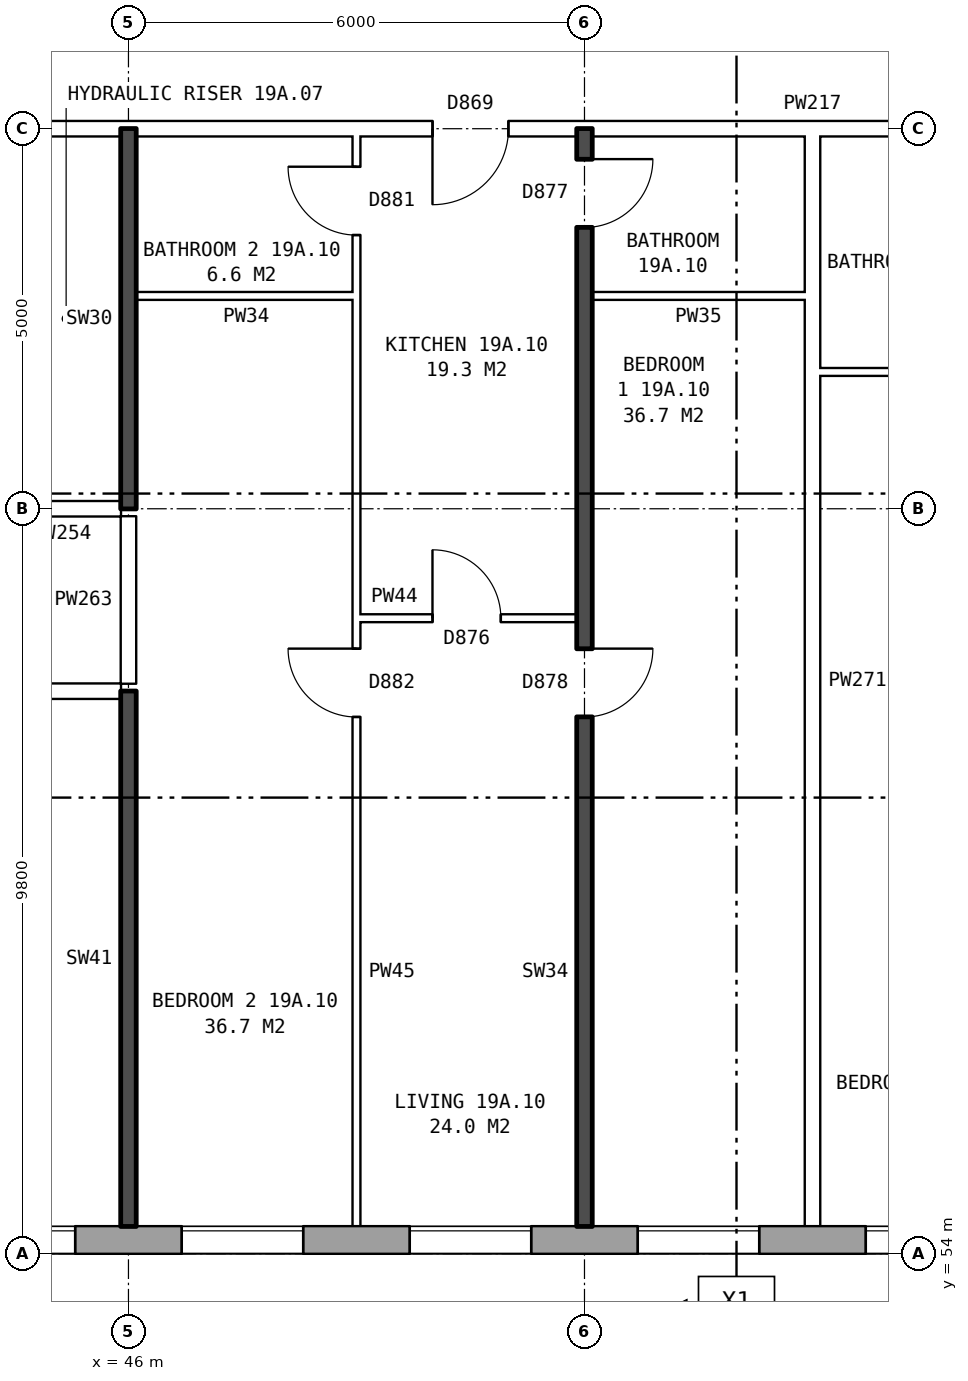
"""IFC4 building model, lengths in metres.
Left out: names, types, materials, properties, quantities, classifications, styles, units other than length and angle.
Written with IfcOpenShell. Run it as: python <this file> out.ifc"""

import sys

from ifc_helpers import new_model, si_unit, direction, frame, frame_2d, origin, place, context, subcontext, project, spatial, rectangle, extrude, element, fill, save


model = new_model("IFC4")
c1 = context("Model", 3, precision=1e-05, world=origin(), true_north=direction((0.0, 1.0)))
c2 = subcontext(c1, "Body", "Model", "MODEL_VIEW")
j1 = project(units=[si_unit("LENGTHUNIT", "METRE"), si_unit("PLANEANGLEUNIT", "RADIAN")], contexts=[c1])
p1 = place(None, origin())
s1 = spatial("IfcSite", under=j1, at=p1, CompositionType="ELEMENT")
p2 = place(p1, origin())
s2 = spatial("IfcBuilding", under=s1, at=p2, CompositionType="ELEMENT")
p3 = place(p2, frame((0.0, 0.0, 71.6)))
s3 = spatial("IfcBuildingStorey", under=s2, at=p3, CompositionType="ELEMENT", Elevation=71.6)
p4 = place(p3, frame((26.325, 54.18, 0.0), z_axis=(0.0, 0.0, 1.0), x_axis=(1.0, 0.0, 0.0)))
e1 = element("IfcWall", 1, at=p4, inside=s3, PredefinedType="STANDARD", context=c2, shape_type="SweptSolid", body=[
    extrude(rectangle(XDim=46.601, YDim=0.36, at=frame_2d((23.3, 0.0))), origin(), (0.0, 0.0, 1.0), 2.85),
])
p5 = place(p4, frame((1.875, 0.0, 1.0)))
e2 = element("IfcOpeningElement", 2, at=p5, cuts=e1, PredefinedType="OPENING", context=c2, shape_type="SweptSolid", body=[
    extrude(rectangle(XDim=0.6, YDim=1.5, at=frame_2d((0.3, 0.75))), frame((0.0, 0.19, 0.0), z_axis=(0.0, -1.0, 0.0), x_axis=(1.0, 0.0, 0.0)), (0.0, 0.0, 1.0), 0.38),
])
p6 = place(p4, frame((5.375, 0.0, 0.8)))
e3 = element("IfcOpeningElement", 3, at=p6, cuts=e1, PredefinedType="OPENING", context=c2, shape_type="SweptSolid", body=[
    extrude(rectangle(XDim=1.6, YDim=1.8, at=frame_2d((0.8, 0.9))), frame((0.0, 0.19, 0.0), z_axis=(0.0, -1.0, 0.0), x_axis=(1.0, 0.0, 0.0)), (0.0, 0.0, 1.0), 0.38),
])
p7 = place(p4, frame((8.375, 0.0, 0.8)))
e4 = element("IfcOpeningElement", 4, at=p7, cuts=e1, PredefinedType="OPENING", context=c2, shape_type="SweptSolid", body=[
    extrude(rectangle(XDim=1.6, YDim=1.8, at=frame_2d((0.8, 0.9))), frame((0.0, 0.19, 0.0), z_axis=(0.0, -1.0, 0.0), x_axis=(1.0, 0.0, 0.0)), (0.0, 0.0, 1.0), 0.38),
])
p8 = place(p4, frame((11.375, 0.0, 0.8)))
e5 = element("IfcOpeningElement", 5, at=p8, cuts=e1, PredefinedType="OPENING", context=c2, shape_type="SweptSolid", body=[
    extrude(rectangle(XDim=1.6, YDim=1.8, at=frame_2d((0.8, 0.9))), frame((0.0, 0.19, 0.0), z_axis=(0.0, -1.0, 0.0), x_axis=(1.0, 0.0, 0.0)), (0.0, 0.0, 1.0), 0.38),
])
p9 = place(p4, frame((14.375, 0.0, 0.8)))
e6 = element("IfcOpeningElement", 6, at=p9, cuts=e1, PredefinedType="OPENING", context=c2, shape_type="SweptSolid", body=[
    extrude(rectangle(XDim=1.6, YDim=1.8, at=frame_2d((0.8, 0.9))), frame((0.0, 0.19, 0.0), z_axis=(0.0, -1.0, 0.0), x_axis=(1.0, 0.0, 0.0)), (0.0, 0.0, 1.0), 0.38),
])
p10 = place(p4, frame((17.375, 0.0, 0.8)))
e7 = element("IfcOpeningElement", 7, at=p10, cuts=e1, PredefinedType="OPENING", context=c2, shape_type="SweptSolid", body=[
    extrude(rectangle(XDim=1.6, YDim=1.8, at=frame_2d((0.8, 0.9))), frame((0.0, 0.19, 0.0), z_axis=(0.0, -1.0, 0.0), x_axis=(1.0, 0.0, 0.0)), (0.0, 0.0, 1.0), 0.38),
])
p11 = place(p4, frame((20.375, 0.0, 0.8)))
e8 = element("IfcOpeningElement", 8, at=p11, cuts=e1, PredefinedType="OPENING", context=c2, shape_type="SweptSolid", body=[
    extrude(rectangle(XDim=1.6, YDim=1.8, at=frame_2d((0.8, 0.9))), frame((0.0, 0.19, 0.0), z_axis=(0.0, -1.0, 0.0), x_axis=(1.0, 0.0, 0.0)), (0.0, 0.0, 1.0), 0.38),
])
p12 = place(p4, frame((23.375, 0.0, 0.8)))
e9 = element("IfcOpeningElement", 9, at=p12, cuts=e1, PredefinedType="OPENING", context=c2, shape_type="SweptSolid", body=[
    extrude(rectangle(XDim=1.6, YDim=1.8, at=frame_2d((0.8, 0.9))), frame((0.0, 0.19, 0.0), z_axis=(0.0, -1.0, 0.0), x_axis=(1.0, 0.0, 0.0)), (0.0, 0.0, 1.0), 0.38),
])
p13 = place(p4, frame((26.375, 0.0, 0.8)))
e10 = element("IfcOpeningElement", 10, at=p13, cuts=e1, PredefinedType="OPENING", context=c2, shape_type="SweptSolid", body=[
    extrude(rectangle(XDim=1.6, YDim=1.8, at=frame_2d((0.8, 0.9))), frame((0.0, 0.19, 0.0), z_axis=(0.0, -1.0, 0.0), x_axis=(1.0, 0.0, 0.0)), (0.0, 0.0, 1.0), 0.38),
])
p14 = place(p4, frame((29.375, 0.0, 0.8)))
e11 = element("IfcOpeningElement", 11, at=p14, cuts=e1, PredefinedType="OPENING", context=c2, shape_type="SweptSolid", body=[
    extrude(rectangle(XDim=1.6, YDim=1.8, at=frame_2d((0.8, 0.9))), frame((0.0, 0.19, 0.0), z_axis=(0.0, -1.0, 0.0), x_axis=(1.0, 0.0, 0.0)), (0.0, 0.0, 1.0), 0.38),
])
p15 = place(p4, frame((32.375, 0.0, 0.8)))
e12 = element("IfcOpeningElement", 12, at=p15, cuts=e1, PredefinedType="OPENING", context=c2, shape_type="SweptSolid", body=[
    extrude(rectangle(XDim=1.6, YDim=1.8, at=frame_2d((0.8, 0.9))), frame((0.0, 0.19, 0.0), z_axis=(0.0, -1.0, 0.0), x_axis=(1.0, 0.0, 0.0)), (0.0, 0.0, 1.0), 0.38),
])
p16 = place(p4, frame((35.375, 0.0, 0.8)))
e13 = element("IfcOpeningElement", 13, at=p16, cuts=e1, PredefinedType="OPENING", context=c2, shape_type="SweptSolid", body=[
    extrude(rectangle(XDim=1.6, YDim=1.8, at=frame_2d((0.8, 0.9))), frame((0.0, 0.19, 0.0), z_axis=(0.0, -1.0, 0.0), x_axis=(1.0, 0.0, 0.0)), (0.0, 0.0, 1.0), 0.38),
])
p17 = place(p4, frame((38.375, 0.0, 0.8)))
e14 = element("IfcOpeningElement", 14, at=p17, cuts=e1, PredefinedType="OPENING", context=c2, shape_type="SweptSolid", body=[
    extrude(rectangle(XDim=1.6, YDim=1.8, at=frame_2d((0.8, 0.9))), frame((0.0, 0.19, 0.0), z_axis=(0.0, -1.0, 0.0), x_axis=(1.0, 0.0, 0.0)), (0.0, 0.0, 1.0), 0.38),
])
p18 = place(p4, frame((40.275, 0.0, 0.8)))
e15 = element("IfcOpeningElement", 15, at=p18, cuts=e1, PredefinedType="OPENING", context=c2, shape_type="SweptSolid", body=[
    extrude(rectangle(XDim=0.6, YDim=1.8, at=frame_2d((0.3, 0.9))), frame((0.0, 0.19, 0.0), z_axis=(0.0, -1.0, 0.0), x_axis=(1.0, 0.0, 0.0)), (0.0, 0.0, 1.0), 0.38),
])
p19 = place(p4, frame((44.375, 0.0, 0.8)))
e16 = element("IfcOpeningElement", 16, at=p19, cuts=e1, PredefinedType="OPENING", context=c2, shape_type="SweptSolid", body=[
    extrude(rectangle(XDim=1.6, YDim=1.8, at=frame_2d((0.8, 0.9))), frame((0.0, 0.19, 0.0), z_axis=(0.0, -1.0, 0.0), x_axis=(1.0, 0.0, 0.0)), (0.0, 0.0, 1.0), 0.38),
])
p20 = place(p4, frame((2.775, 0.0, 1.7)))
e17 = element("IfcOpeningElement", 17, at=p20, cuts=e1, PredefinedType="OPENING", context=c2, shape_type="SweptSolid", body=[
    extrude(rectangle(XDim=0.6, YDim=0.9, at=frame_2d((0.3, 0.45))), frame((0.0, 0.19, 0.0), z_axis=(0.0, -1.0, 0.0), x_axis=(1.0, 0.0, 0.0)), (0.0, 0.0, 1.0), 0.38),
])
p21 = place(p4, frame((41.175, 0.0, 0.8)))
e18 = element("IfcOpeningElement", 18, at=p21, cuts=e1, PredefinedType="OPENING", context=c2, shape_type="SweptSolid", body=[
    extrude(rectangle(XDim=0.8, YDim=0.9, at=frame_2d((0.4, 0.45))), frame((0.0, 0.19, 0.0), z_axis=(0.0, -1.0, 0.0), x_axis=(1.0, 0.0, 0.0)), (0.0, 0.0, 1.0), 0.38),
])
p22 = place(p3, frame((23.61, 61.4, 0.0), z_axis=(0.0, 0.0, 1.0), x_axis=(1.0, 0.0, 0.0)))
e19 = element("IfcWall", 19, at=p22, inside=s3, PredefinedType="PARTITIONING", context=c2, shape_type="SweptSolid", body=[
    extrude(rectangle(XDim=22.29, YDim=0.2, at=frame_2d((11.145, 0.0))), origin(), (0.0, 0.0, 1.0), 2.85),
])
p23 = place(p22, frame((18.84, 0.0, 0.0)))
e20 = element("IfcOpeningElement", 20, at=p23, cuts=e19, PredefinedType="OPENING", context=c2, shape_type="SweptSolid", body=[
    extrude(rectangle(XDim=1.0, YDim=2.1, at=frame_2d((0.5, 1.05))), frame((0.0, 0.11, 0.0), z_axis=(0.0, -1.0, 0.0), x_axis=(1.0, 0.0, 0.0)), (0.0, 0.0, 1.0), 0.22),
])
p24 = place(p22, frame((6.89, 0.0, 0.0)))
e21 = element("IfcOpeningElement", 21, at=p24, cuts=e19, PredefinedType="OPENING", context=c2, shape_type="SweptSolid", body=[
    extrude(rectangle(XDim=1.0, YDim=2.1, at=frame_2d((0.5, 1.05))), frame((0.0, 0.11, 0.0), z_axis=(0.0, -1.0, 0.0), x_axis=(1.0, 0.0, 0.0)), (0.0, 0.0, 1.0), 0.22),
])
p25 = place(p3, frame((49.0, 62.36, 0.0), z_axis=(0.0, 0.0, 1.0), x_axis=(1.0, 0.0, 0.0)))
e22 = element("IfcWall", 22, at=p25, inside=s3, PredefinedType="PARTITIONING", context=c2, shape_type="SweptSolid", body=[
    extrude(rectangle(XDim=2.9, YDim=0.1, at=frame_2d((1.45, 0.0))), origin(), (0.0, 0.0, 1.0), 2.85),
])
p26 = place(p25, frame((1.0, 0.0, 0.0)))
e23 = element("IfcOpeningElement", 23, at=p26, cuts=e22, PredefinedType="OPENING", context=c2, shape_type="SweptSolid", body=[
    extrude(rectangle(XDim=0.9, YDim=2.1, at=frame_2d((0.45, 1.05))), frame((0.0, 0.06, 0.0), z_axis=(0.0, -1.0, 0.0), x_axis=(1.0, 0.0, 0.0)), (0.0, 0.0, 1.0), 0.12),
])
p27 = place(p3, frame((44.36, 63.8, 0.0), z_axis=(0.0, 0.0, 1.0), x_axis=(1.0, 0.0, 0.0)))
e24 = element("IfcWall", 24, at=p27, inside=s3, PredefinedType="PARTITIONING", context=c2, shape_type="SweptSolid", body=[
    extrude(rectangle(XDim=1.54, YDim=0.2, at=frame_2d((0.77, 0.0))), origin(), (0.0, 0.0, 1.0), 2.85),
])
p28 = place(p3, frame((55.1, 65.6, 0.0), z_axis=(0.0, 0.0, 1.0), x_axis=(1.0, 0.0, 0.0)))
e25 = element("IfcWall", 25, at=p28, inside=s3, PredefinedType="PARTITIONING", context=c2, shape_type="SweptSolid", body=[
    extrude(rectangle(XDim=2.8, YDim=0.1, at=frame_2d((1.4, 0.0))), origin(), (0.0, 0.0, 1.0), 2.85),
])
p29 = place(p3, frame((46.1, 66.6, 0.0), z_axis=(0.0, 0.0, 1.0), x_axis=(1.0, 0.0, 0.0)))
e26 = element("IfcWall", 26, at=p29, inside=s3, PredefinedType="PARTITIONING", context=c2, shape_type="SweptSolid", body=[
    extrude(rectangle(XDim=2.9, YDim=0.1, at=frame_2d((1.45, 0.0))), origin(), (0.0, 0.0, 1.0), 2.85),
])
p30 = place(p3, frame((52.1, 66.6, 0.0), z_axis=(0.0, 0.0, 1.0), x_axis=(1.0, 0.0, 0.0)))
e27 = element("IfcWall", 27, at=p30, inside=s3, PredefinedType="PARTITIONING", context=c2, shape_type="SweptSolid", body=[
    extrude(rectangle(XDim=2.8, YDim=0.1, at=frame_2d((1.4, 0.0))), origin(), (0.0, 0.0, 1.0), 2.85),
])
p31 = place(p3, frame((44.36, 68.8, 0.0), z_axis=(0.0, 0.0, 1.0), x_axis=(1.0, 0.0, 0.0)))
e28 = element("IfcWall", 28, at=p31, inside=s3, PredefinedType="PARTITIONING", context=c2, shape_type="SweptSolid", body=[
    extrude(rectangle(XDim=19.28, YDim=0.2, at=frame_2d((9.64, 0.0))), origin(), (0.0, 0.0, 1.0), 2.85),
])
p32 = place(p31, frame((14.64, 0.0, 0.0)))
e29 = element("IfcOpeningElement", 29, at=p32, cuts=e28, PredefinedType="OPENING", context=c2, shape_type="SweptSolid", body=[
    extrude(rectangle(XDim=1.0, YDim=2.1, at=frame_2d((0.5, 1.05))), frame((0.0, 0.11, 0.0), z_axis=(0.0, -1.0, 0.0), x_axis=(1.0, 0.0, 0.0)), (0.0, 0.0, 1.0), 0.22),
])
p33 = place(p31, frame((5.64, 0.0, 0.0)))
e30 = element("IfcOpeningElement", 30, at=p33, cuts=e28, PredefinedType="OPENING", context=c2, shape_type="SweptSolid", body=[
    extrude(rectangle(XDim=1.0, YDim=2.1, at=frame_2d((0.5, 1.05))), frame((0.0, 0.11, 0.0), z_axis=(0.0, -1.0, 0.0), x_axis=(1.0, 0.0, 0.0)), (0.0, 0.0, 1.0), 0.22),
])
p34 = place(p3, frame((46.0, 54.36, 0.0), z_axis=(0.0, 0.0, 1.0), x_axis=(0.0, 1.0, 0.0)))
e31 = element("IfcWall", 31, at=p34, inside=s3, PredefinedType="SOLIDWALL", context=c2, shape_type="SweptSolid", body=[
    extrude(rectangle(XDim=7.04, YDim=0.2, at=frame_2d((3.52, 0.0))), origin(), (0.0, 0.0, 1.0), 2.85),
])
p35 = place(p3, frame((46.0, 61.5, 0.0), z_axis=(0.0, 0.0, 1.0), x_axis=(0.0, 1.0, 0.0)))
e32 = element("IfcWall", 32, at=p35, inside=s3, PredefinedType="PARTITIONING", context=c2, shape_type="SweptSolid", body=[
    extrude(rectangle(XDim=2.2, YDim=0.2, at=frame_2d((1.1, 0.0))), origin(), (0.0, 0.0, 1.0), 2.85),
])
p36 = place(p3, frame((46.0, 63.8, 0.0), z_axis=(0.0, 0.0, 1.0), x_axis=(0.0, 1.0, 0.0)))
e33 = element("IfcWall", 33, at=p36, inside=s3, PredefinedType="SOLIDWALL", context=c2, shape_type="SweptSolid", body=[
    extrude(rectangle(XDim=5.0, YDim=0.2, at=frame_2d((2.5, 0.0))), origin(), (0.0, 0.0, 1.0), 2.85),
])
p37 = place(p3, frame((49.0, 54.36, 0.0), z_axis=(0.0, 0.0, 1.0), x_axis=(0.0, 1.0, 0.0)))
e34 = element("IfcWall", 34, at=p37, inside=s3, PredefinedType="PARTITIONING", context=c2, shape_type="SweptSolid", body=[
    extrude(rectangle(XDim=14.34, YDim=0.1, at=frame_2d((7.17, 0.0))), origin(), (0.0, 0.0, 1.0), 2.85),
])
p38 = place(p37, frame((6.7, 0.0, 0.0)))
e35 = element("IfcOpeningElement", 35, at=p38, cuts=e34, PredefinedType="OPENING", context=c2, shape_type="SweptSolid", body=[
    extrude(rectangle(XDim=0.9, YDim=2.1, at=frame_2d((0.45, 1.05))), frame((0.0, 0.06, 0.0), z_axis=(0.0, -1.0, 0.0), x_axis=(1.0, 0.0, 0.0)), (0.0, 0.0, 1.0), 0.12),
])
p39 = place(p37, frame((13.04, 0.0, 0.0)))
e36 = element("IfcOpeningElement", 36, at=p39, cuts=e34, PredefinedType="OPENING", context=c2, shape_type="SweptSolid", body=[
    extrude(rectangle(XDim=0.9, YDim=2.1, at=frame_2d((0.45, 1.05))), frame((0.0, 0.06, 0.0), z_axis=(0.0, -1.0, 0.0), x_axis=(1.0, 0.0, 0.0)), (0.0, 0.0, 1.0), 0.12),
])
p40 = place(p3, frame((52.0, 54.36, 0.0), z_axis=(0.0, 0.0, 1.0), x_axis=(0.0, 1.0, 0.0)))
e37 = element("IfcWall", 37, at=p40, inside=s3, PredefinedType="SOLIDWALL", context=c2, shape_type="SweptSolid", body=[
    extrude(rectangle(XDim=14.44, YDim=0.2, at=frame_2d((7.22, 0.0))), origin(), (0.0, 0.0, 1.0), 2.85),
])
p41 = place(p40, frame((6.7, 0.0, 0.0)))
e38 = element("IfcOpeningElement", 38, at=p41, cuts=e37, PredefinedType="OPENING", context=c2, shape_type="SweptSolid", body=[
    extrude(rectangle(XDim=0.9, YDim=2.1, at=frame_2d((0.45, 1.05))), frame((0.0, 0.11, 0.0), z_axis=(0.0, -1.0, 0.0), x_axis=(1.0, 0.0, 0.0)), (0.0, 0.0, 1.0), 0.22),
])
p42 = place(p40, frame((13.14, 0.0, 0.0)))
e39 = element("IfcOpeningElement", 39, at=p42, cuts=e37, PredefinedType="OPENING", context=c2, shape_type="SweptSolid", body=[
    extrude(rectangle(XDim=0.9, YDim=2.1, at=frame_2d((0.45, 1.05))), frame((0.0, 0.11, 0.0), z_axis=(0.0, -1.0, 0.0), x_axis=(1.0, 0.0, 0.0)), (0.0, 0.0, 1.0), 0.22),
])
p43 = place(p3, frame((55.0, 54.36, 0.0), z_axis=(0.0, 0.0, 1.0), x_axis=(0.0, 1.0, 0.0)))
e40 = element("IfcWall", 40, at=p43, inside=s3, PredefinedType="PARTITIONING", context=c2, shape_type="SweptSolid", body=[
    extrude(rectangle(XDim=14.34, YDim=0.2, at=frame_2d((7.17, 0.0))), origin(), (0.0, 0.0, 1.0), 2.85),
])
p44 = place(p10, origin())
e41 = element("IfcWindow", 41, at=p44, inside=s3, PartitioningType="SINGLE_PANEL", PredefinedType="WINDOW", context=c2, shape_type="SweptSolid", body=[
    extrude(rectangle(XDim=1.6, YDim=1.8, at=frame_2d((0.8, 0.9))), frame((0.0, 0.15, 0.0), z_axis=(0.0, -1.0, 0.0), x_axis=(1.0, 0.0, 0.0)), (0.0, 0.0, 1.0), 0.06),
])
fill(e7, e41)
p45 = place(p11, origin())
e42 = element("IfcWindow", 42, at=p45, inside=s3, PartitioningType="SINGLE_PANEL", PredefinedType="WINDOW", context=c2, shape_type="SweptSolid", body=[
    extrude(rectangle(XDim=1.6, YDim=1.8, at=frame_2d((0.8, 0.9))), frame((0.0, 0.15, 0.0), z_axis=(0.0, -1.0, 0.0), x_axis=(1.0, 0.0, 0.0)), (0.0, 0.0, 1.0), 0.06),
])
fill(e8, e42)
p46 = place(p12, origin())
e43 = element("IfcWindow", 43, at=p46, inside=s3, PartitioningType="SINGLE_PANEL", PredefinedType="WINDOW", context=c2, shape_type="SweptSolid", body=[
    extrude(rectangle(XDim=1.6, YDim=1.8, at=frame_2d((0.8, 0.9))), frame((0.0, 0.15, 0.0), z_axis=(0.0, -1.0, 0.0), x_axis=(1.0, 0.0, 0.0)), (0.0, 0.0, 1.0), 0.06),
])
fill(e9, e43)
p47 = place(p13, origin())
e44 = element("IfcWindow", 44, at=p47, inside=s3, PartitioningType="SINGLE_PANEL", PredefinedType="WINDOW", context=c2, shape_type="SweptSolid", body=[
    extrude(rectangle(XDim=1.6, YDim=1.8, at=frame_2d((0.8, 0.9))), frame((0.0, 0.15, 0.0), z_axis=(0.0, -1.0, 0.0), x_axis=(1.0, 0.0, 0.0)), (0.0, 0.0, 1.0), 0.06),
])
fill(e10, e44)
p48 = place(p14, origin())
e45 = element("IfcWindow", 45, at=p48, inside=s3, PartitioningType="SINGLE_PANEL", PredefinedType="WINDOW", context=c2, shape_type="SweptSolid", body=[
    extrude(rectangle(XDim=1.6, YDim=1.8, at=frame_2d((0.8, 0.9))), frame((0.0, 0.15, 0.0), z_axis=(0.0, -1.0, 0.0), x_axis=(1.0, 0.0, 0.0)), (0.0, 0.0, 1.0), 0.06),
])
fill(e11, e45)
p49 = place(p41, frame((0.9, 0.0, 0.0), z_axis=(0.0, 0.0, 1.0), x_axis=(-1.0, 0.0, 0.0)))
e46 = element("IfcDoor", 46, at=p49, inside=s3, OperationType="SINGLE_SWING_LEFT", PredefinedType="DOOR", context=c2, shape_type="SweptSolid", body=[
    extrude(rectangle(XDim=0.9, YDim=2.1, at=frame_2d((0.45, 1.05))), frame((0.0, 0.025, 0.0), z_axis=(0.0, -1.0, 0.0), x_axis=(1.0, 0.0, 0.0)), (0.0, 0.0, 1.0), 0.05),
])
fill(e38, e46)
p50 = place(p38, origin())
e47 = element("IfcDoor", 47, at=p50, inside=s3, OperationType="SINGLE_SWING_RIGHT", PredefinedType="DOOR", context=c2, shape_type="SweptSolid", body=[
    extrude(rectangle(XDim=0.9, YDim=2.1, at=frame_2d((0.45, 1.05))), frame((0.0, 0.025, 0.0), z_axis=(0.0, -1.0, 0.0), x_axis=(1.0, 0.0, 0.0)), (0.0, 0.0, 1.0), 0.05),
])
fill(e35, e47)
p51 = place(p33, frame((1.0, 0.0, 0.0), z_axis=(0.0, 0.0, 1.0), x_axis=(-1.0, 0.0, 0.0)))
e48 = element("IfcDoor", 48, at=p51, inside=s3, OperationType="SINGLE_SWING_RIGHT", PredefinedType="DOOR", context=c2, shape_type="SweptSolid", body=[
    extrude(rectangle(XDim=1.0, YDim=2.1, at=frame_2d((0.5, 1.05))), frame((0.0, 0.025, 0.0), z_axis=(0.0, -1.0, 0.0), x_axis=(1.0, 0.0, 0.0)), (0.0, 0.0, 1.0), 0.05),
])
fill(e30, e48)
p52 = place(p26, origin())
e49 = element("IfcDoor", 49, at=p52, inside=s3, OperationType="SINGLE_SWING_LEFT", PredefinedType="DOOR", context=c2, shape_type="SweptSolid", body=[
    extrude(rectangle(XDim=0.9, YDim=2.1, at=frame_2d((0.45, 1.05))), frame((0.0, 0.025, 0.0), z_axis=(0.0, -1.0, 0.0), x_axis=(1.0, 0.0, 0.0)), (0.0, 0.0, 1.0), 0.05),
])
fill(e23, e49)
p53 = place(p42, frame((0.9, 0.0, 0.0), z_axis=(0.0, 0.0, 1.0), x_axis=(-1.0, 0.0, 0.0)))
e50 = element("IfcDoor", 50, at=p53, inside=s3, OperationType="SINGLE_SWING_LEFT", PredefinedType="DOOR", context=c2, shape_type="SweptSolid", body=[
    extrude(rectangle(XDim=0.9, YDim=2.1, at=frame_2d((0.45, 1.05))), frame((0.0, 0.025, 0.0), z_axis=(0.0, -1.0, 0.0), x_axis=(1.0, 0.0, 0.0)), (0.0, 0.0, 1.0), 0.05),
])
fill(e39, e50)
p54 = place(p39, origin())
e51 = element("IfcDoor", 51, at=p54, inside=s3, OperationType="SINGLE_SWING_RIGHT", PredefinedType="DOOR", context=c2, shape_type="SweptSolid", body=[
    extrude(rectangle(XDim=0.9, YDim=2.1, at=frame_2d((0.45, 1.05))), frame((0.0, 0.025, 0.0), z_axis=(0.0, -1.0, 0.0), x_axis=(1.0, 0.0, 0.0)), (0.0, 0.0, 1.0), 0.05),
])
fill(e36, e51)
save(model, sys.argv[1])
